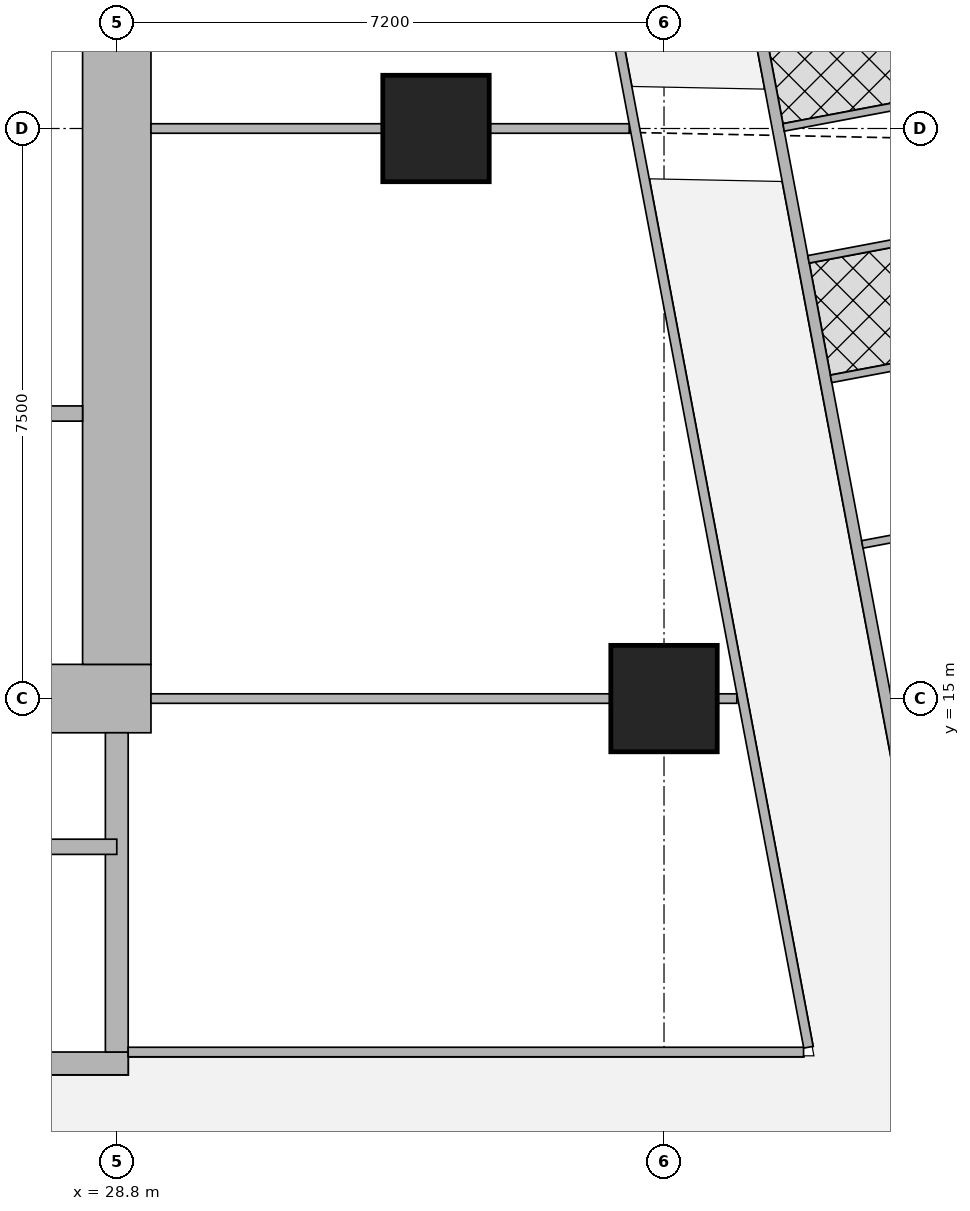
"""IFC4 building model, lengths in metres.
Left out: names, types, materials, properties, quantities, classifications, styles, units other than length and angle.
Written with IfcOpenShell. Run it as: python <this file> out.ifc"""

import sys

from ifc_helpers import new_model, si_unit, direction, frame, frame_2d, origin, origin_2d, place, context, subcontext, project, spatial, rectangle, extrude, element, fill, save


model = new_model("IFC4")
c1 = context("Model", 3, precision=1e-05, world=origin(), true_north=direction((0.0, 1.0)))
c2 = subcontext(c1, "Body", "Model", "MODEL_VIEW")
j1 = project(units=[si_unit("LENGTHUNIT", "METRE"), si_unit("PLANEANGLEUNIT", "RADIAN")], contexts=[c1])
p1 = place(None, origin())
s1 = spatial("IfcSite", under=j1, at=p1, CompositionType="ELEMENT")
p2 = place(p1, origin())
s2 = spatial("IfcBuilding", under=s1, at=p2, CompositionType="ELEMENT")
p3 = place(p2, frame((0.0, 0.0, 204.95)))
s3 = spatial("IfcBuildingStorey", under=s2, at=p3, CompositionType="ELEMENT", Elevation=204.95)
for number, where, z_axis, x_axis in (
    (1, (36.0, 15.0, 0.0), (0.0, 0.0, 1.0), (1.0, 0.0, 0.0)),
    (2, (33.0, 22.5, 0.0), (0.0, 0.0, 1.0), (1.0, 0.0, 0.0)),
):
    element("IfcColumn", number, at=place(p3, frame(where, z_axis=z_axis, x_axis=x_axis)), inside=s3, PredefinedType="COLUMN", context=c2, shape_type="SweptSolid", body=[
        extrude(rectangle(XDim=1.4, YDim=1.4, at=origin_2d()), origin(), (0.0, 0.0, 1.0), 3.75),
    ])
p4 = place(p3, frame((13.95, 15.0, 0.0), z_axis=(0.0, 0.0, 1.0), x_axis=(1.0, 0.0, 0.0)))
e3 = element("IfcWall", 3, at=p4, inside=s3, PredefinedType="SHEAR", context=c2, shape_type="SweptSolid", body=[
    extrude(rectangle(XDim=15.3, YDim=0.9, at=frame_2d((7.65, 0.0))), origin(), (0.0, 0.0, 1.0), 3.75),
])
p5 = place(p4, frame((4.45, 0.0, 0.0)))
e4 = element("IfcOpeningElement", 4, at=p5, cuts=e3, PredefinedType="OPENING", context=c2, shape_type="SweptSolid", body=[
    extrude(rectangle(XDim=1.8, YDim=2.1, at=frame_2d((0.9, 1.05))), frame((0.0, 0.46, 0.0), z_axis=(0.0, -1.0, 0.0), x_axis=(1.0, 0.0, 0.0)), (0.0, 0.0, 1.0), 0.92),
])
p6 = place(p4, frame((10.7, 0.0, 0.0)))
e5 = element("IfcOpeningElement", 5, at=p6, cuts=e3, PredefinedType="OPENING", context=c2, shape_type="SweptSolid", body=[
    extrude(rectangle(XDim=1.1, YDim=2.1, at=frame_2d((0.55, 1.05))), frame((0.0, 0.46, 0.0), z_axis=(0.0, -1.0, 0.0), x_axis=(1.0, 0.0, 0.0)), (0.0, 0.0, 1.0), 0.92),
])
p7 = place(p3, frame((28.8, 15.45, 0.0), z_axis=(0.0, 0.0, 1.0), x_axis=(0.0, 1.0, 0.0)))
e6 = element("IfcWall", 6, at=p7, inside=s3, PredefinedType="SHEAR", context=c2, shape_type="SweptSolid", body=[
    extrude(rectangle(XDim=14.1, YDim=0.9, at=frame_2d((7.05, 0.0))), origin(), (0.0, 0.0, 1.0), 3.75),
])
p8 = place(p3, frame((21.45, 10.2, 0.0), z_axis=(0.0, 0.0, 1.0), x_axis=(1.0, 0.0, 0.0)))
e7 = element("IfcWall", 7, at=p8, inside=s3, PredefinedType="SHEAR", context=c2, shape_type="SweptSolid", body=[
    extrude(rectangle(XDim=7.5, YDim=0.3, at=frame_2d((3.75, 0.0))), origin(), (0.0, 0.0, 1.0), 3.75),
])
p9 = place(p8, frame((0.5, 0.0, 0.0)))
e8 = element("IfcOpeningElement", 8, at=p9, cuts=e7, PredefinedType="OPENING", context=c2, shape_type="SweptSolid", body=[
    extrude(rectangle(XDim=1.1, YDim=2.1, at=frame_2d((0.55, 1.05))), frame((0.0, 0.16, 0.0), z_axis=(0.0, -1.0, 0.0), x_axis=(1.0, 0.0, 0.0)), (0.0, 0.0, 1.0), 0.32),
])
p10 = place(p3, frame((28.8, 10.35, 0.0), z_axis=(0.0, 0.0, 1.0), x_axis=(0.0, 1.0, 0.0)))
e9 = element("IfcWall", 9, at=p10, inside=s3, PredefinedType="SHEAR", context=c2, shape_type="SweptSolid", body=[
    extrude(rectangle(XDim=4.2, YDim=0.3, at=frame_2d((2.1, 0.0))), origin(), (0.0, 0.0, 1.0), 3.75),
])
p11 = place(p3, frame((33.68, 42.723, 0.0), z_axis=(0.0, 0.0, 1.0), x_axis=(0.185601160014, -0.982625162207, 0.0)))
e10 = element("IfcWall", 10, at=p11, inside=s3, PredefinedType="SOLIDWALL", context=c2, shape_type="SweptSolid", body=[
    extrude(rectangle(XDim=41.051, YDim=0.15, at=frame_2d((20.526, 0.0))), origin(), (0.0, 0.0, 1.0), 2.5),
])
p12 = place(p11, frame((12.307, 0.0, 0.0)))
e11 = element("IfcOpeningElement", 11, at=p12, cuts=e10, PredefinedType="OPENING", context=c2, shape_type="SweptSolid", body=[
    extrude(rectangle(XDim=1.0, YDim=2.1, at=frame_2d((0.5, 1.05))), frame((0.0, 0.085, 0.0), z_axis=(0.0, -1.0, 0.0), x_axis=(1.0, 0.0, 0.0)), (0.0, 0.0, 1.0), 0.17),
])
p13 = place(p11, frame((16.123, 0.0, 0.0)))
e12 = element("IfcOpeningElement", 12, at=p13, cuts=e10, PredefinedType="OPENING", context=c2, shape_type="SweptSolid", body=[
    extrude(rectangle(XDim=1.0, YDim=2.1, at=frame_2d((0.5, 1.05))), frame((0.0, 0.085, 0.0), z_axis=(0.0, -1.0, 0.0), x_axis=(1.0, 0.0, 0.0)), (0.0, 0.0, 1.0), 0.17),
])
p14 = place(p11, frame((30.902, 0.0, 0.0)))
e13 = element("IfcOpeningElement", 13, at=p14, cuts=e10, PredefinedType="OPENING", context=c2, shape_type="SweptSolid", body=[
    extrude(rectangle(XDim=1.0, YDim=2.1, at=frame_2d((0.5, 1.05))), frame((0.0, 0.085, 0.0), z_axis=(0.0, -1.0, 0.0), x_axis=(1.0, 0.0, 0.0)), (0.0, 0.0, 1.0), 0.17),
])
p15 = place(p3, frame((41.365, 21.433, 0.0), z_axis=(0.0, 0.0, 1.0), x_axis=(-0.982638553676, -0.185530247748, 0.0)))
e14 = element("IfcWall", 14, at=p15, inside=s3, PredefinedType="PARTITIONING", context=c2, shape_type="SweptSolid", body=[
    extrude(rectangle(XDim=3.525, YDim=0.1, at=frame_2d((1.763, 0.0))), origin(), (0.0, 0.0, 1.0), 3.5),
])
p16 = place(p3, frame((42.073, 17.682, 0.0), z_axis=(0.0, 0.0, 1.0), x_axis=(-0.98265117712, -0.185463376723, 0.0)))
e15 = element("IfcWall", 15, at=p16, inside=s3, PredefinedType="PARTITIONING", context=c2, shape_type="SweptSolid", body=[
    extrude(rectangle(XDim=3.525, YDim=0.1, at=frame_2d((1.763, 0.0))), origin(), (0.0, 0.0, 1.0), 3.5),
])
p17 = place(p16, frame((1.325, 0.0, 0.0)))
e16 = element("IfcOpeningElement", 16, at=p17, cuts=e15, PredefinedType="OPENING", context=c2, shape_type="SweptSolid", body=[
    extrude(rectangle(XDim=0.9, YDim=2.1, at=frame_2d((0.45, 1.05))), frame((0.0, 0.06, 0.0), z_axis=(0.0, -1.0, 0.0), x_axis=(1.0, 0.0, 0.0)), (0.0, 0.0, 1.0), 0.12),
])
p18 = place(p3, frame((41.037, 23.168, 0.0), z_axis=(0.0, 0.0, 1.0), x_axis=(-0.982638553676, -0.185530247748, 0.0)))
e17 = element("IfcWall", 17, at=p18, inside=s3, PredefinedType="PARTITIONING", context=c2, shape_type="SweptSolid", body=[
    extrude(rectangle(XDim=3.525, YDim=0.1, at=frame_2d((1.763, 0.0))), origin(), (0.0, 0.0, 1.0), 2.5),
])
p19 = place(p3, frame((41.662, 19.861, 0.0), z_axis=(0.0, 0.0, 1.0), x_axis=(-0.982588017646, -0.185797706064, 0.0)))
e18 = element("IfcWall", 18, at=p19, inside=s3, PredefinedType="PARTITIONING", context=c2, shape_type="SweptSolid", body=[
    extrude(rectangle(XDim=3.525, YDim=0.1, at=frame_2d((1.763, 0.0))), origin(), (0.0, 0.0, 1.0), 3.5),
])
p20 = place(p3, frame((28.95, 10.35, 0.0), z_axis=(0.0, 0.0, 1.0), x_axis=(1.0, 0.0, 0.0)))
e19 = element("IfcWall", 19, at=p20, inside=s3, PredefinedType="PARTITIONING", context=c2, shape_type="SweptSolid", body=[
    extrude(rectangle(XDim=8.886, YDim=0.125, at=frame_2d((4.443, 0.0))), origin(), (0.0, 0.0, 1.0), 3.5),
])
p21 = place(p3, frame((37.9, 10.413, 0.0), z_axis=(0.0, 0.0, 1.0), x_axis=(-0.185589740669, 0.982627319058, 0.0)))
e20 = element("IfcWall", 20, at=p21, inside=s3, PredefinedType="PARTITIONING", context=c2, shape_type="SweptSolid", body=[
    extrude(rectangle(XDim=24.602, YDim=0.125, at=frame_2d((12.301, 0.0))), origin(), (0.0, 0.0, 1.0), 2.5),
])
p22 = place(p21, frame((0.708, 0.0, 0.0)))
e21 = element("IfcOpeningElement", 21, at=p22, cuts=e20, PredefinedType="OPENING", context=c2, shape_type="SweptSolid", body=[
    extrude(rectangle(XDim=1.0, YDim=2.1, at=frame_2d((0.5, 1.05))), frame((0.0, 0.073, 0.0), z_axis=(0.0, -1.0, 0.0), x_axis=(1.0, 0.0, 0.0)), (0.0, 0.0, 1.0), 0.145),
])
p23 = place(p21, frame((5.65, 0.0, 0.0)))
e22 = element("IfcOpeningElement", 22, at=p23, cuts=e20, PredefinedType="OPENING", context=c2, shape_type="SweptSolid", body=[
    extrude(rectangle(XDim=1.0, YDim=2.1, at=frame_2d((0.5, 1.05))), frame((0.0, 0.073, 0.0), z_axis=(0.0, -1.0, 0.0), x_axis=(1.0, 0.0, 0.0)), (0.0, 0.0, 1.0), 0.145),
])
p24 = place(p21, frame((13.124, 0.0, 0.0)))
e23 = element("IfcOpeningElement", 23, at=p24, cuts=e20, PredefinedType="OPENING", context=c2, shape_type="SweptSolid", body=[
    extrude(rectangle(XDim=1.0, YDim=2.1, at=frame_2d((0.5, 1.05))), frame((0.0, 0.073, 0.0), z_axis=(0.0, -1.0, 0.0), x_axis=(1.0, 0.0, 0.0)), (0.0, 0.0, 1.0), 0.145),
])
p25 = place(p21, frame((16.94, 0.0, 0.0)))
e24 = element("IfcOpeningElement", 24, at=p25, cuts=e20, PredefinedType="OPENING", context=c2, shape_type="SweptSolid", body=[
    extrude(rectangle(XDim=1.0, YDim=2.1, at=frame_2d((0.5, 1.05))), frame((0.0, 0.073, 0.0), z_axis=(0.0, -1.0, 0.0), x_axis=(1.0, 0.0, 0.0)), (0.0, 0.0, 1.0), 0.145),
])
p26 = place(p21, frame((20.9, 0.0, 0.0)))
e25 = element("IfcOpeningElement", 25, at=p26, cuts=e20, PredefinedType="OPENING", context=c2, shape_type="SweptSolid", body=[
    extrude(rectangle(XDim=1.0, YDim=2.1, at=frame_2d((0.5, 1.05))), frame((0.0, 0.073, 0.0), z_axis=(0.0, -1.0, 0.0), x_axis=(1.0, 0.0, 0.0)), (0.0, 0.0, 1.0), 0.145),
])
p27 = place(p3, frame((29.25, 15.0, 0.0), z_axis=(0.0, 0.0, 1.0), x_axis=(1.0, 0.0, 0.0)))
e26 = element("IfcWall", 26, at=p27, inside=s3, PredefinedType="PARTITIONING", context=c2, shape_type="SweptSolid", body=[
    extrude(rectangle(XDim=6.049, YDim=0.125, at=frame_2d((3.024, 0.0))), origin(), (0.0, 0.0, 1.0), 3.5),
])
p28 = place(p3, frame((36.701, 15.0, 0.0), z_axis=(0.0, 0.0, 1.0), x_axis=(1.0, 0.0, 0.0)))
e27 = element("IfcWall", 27, at=p28, inside=s3, PredefinedType="PARTITIONING", context=c2, shape_type="SweptSolid", body=[
    extrude(rectangle(XDim=0.257, YDim=0.125, at=frame_2d((0.128, 0.0))), origin(), (0.0, 0.0, 1.0), 3.5),
])
p29 = place(p3, frame((29.25, 22.5, 0.0), z_axis=(0.0, 0.0, 1.0), x_axis=(1.0, 0.0, 0.0)))
e28 = element("IfcWall", 28, at=p29, inside=s3, PredefinedType="PARTITIONING", context=c2, shape_type="SweptSolid", body=[
    extrude(rectangle(XDim=3.049, YDim=0.125, at=frame_2d((1.524, 0.0))), origin(), (0.0, 0.0, 1.0), 3.5),
])
p30 = place(p3, frame((33.701, 22.5, 0.0), z_axis=(0.0, 0.0, 1.0), x_axis=(1.0, 0.0, 0.0)))
e29 = element("IfcWall", 29, at=p30, inside=s3, PredefinedType="PARTITIONING", context=c2, shape_type="SweptSolid", body=[
    extrude(rectangle(XDim=1.841, YDim=0.125, at=frame_2d((0.92, 0.0))), origin(), (0.0, 0.0, 1.0), 2.5),
])
p31 = place(p3, frame((23.0, 13.05, 0.0), z_axis=(0.0, 0.0, 1.0), x_axis=(1.0, 0.0, 0.0)))
e30 = element("IfcWall", 30, at=p31, inside=s3, PredefinedType="SHEAR", context=c2, shape_type="SweptSolid", body=[
    extrude(rectangle(XDim=5.8, YDim=0.2, at=frame_2d((2.9, 0.0))), origin(), (0.0, 0.0, 1.0), 3.75),
])
p32 = place(p3, frame((27.4, 18.75, 0.0), z_axis=(0.0, 0.0, 1.0), x_axis=(1.0, 0.0, 0.0)))
e31 = element("IfcWall", 31, at=p32, inside=s3, PredefinedType="SOLIDWALL", context=c2, shape_type="SweptSolid", body=[
    extrude(rectangle(XDim=0.95, YDim=0.2, at=frame_2d((0.475, 0.0))), origin(), (0.0, 0.0, 1.0), 3.5),
])
p33 = place(p22, origin())
e32 = element("IfcDoor", 32, at=p33, inside=s3, OperationType="SINGLE_SWING_LEFT", PredefinedType="DOOR", context=c2, shape_type="SweptSolid", body=[
    extrude(rectangle(XDim=1.0, YDim=2.1, at=frame_2d((0.5, 1.05))), frame((0.0, 0.025, 0.0), z_axis=(0.0, -1.0, 0.0), x_axis=(1.0, 0.0, 0.0)), (0.0, 0.0, 1.0), 0.05),
])
fill(e21, e32)
p34 = place(p23, origin())
e33 = element("IfcDoor", 33, at=p34, inside=s3, OperationType="SINGLE_SWING_LEFT", PredefinedType="DOOR", context=c2, shape_type="SweptSolid", body=[
    extrude(rectangle(XDim=1.0, YDim=2.1, at=frame_2d((0.5, 1.05))), frame((0.0, 0.025, 0.0), z_axis=(0.0, -1.0, 0.0), x_axis=(1.0, 0.0, 0.0)), (0.0, 0.0, 1.0), 0.05),
])
fill(e22, e33)
p35 = place(p24, origin())
e34 = element("IfcDoor", 34, at=p35, inside=s3, OperationType="SINGLE_SWING_LEFT", PredefinedType="DOOR", context=c2, shape_type="SweptSolid", body=[
    extrude(rectangle(XDim=1.0, YDim=2.1, at=frame_2d((0.5, 1.05))), frame((0.0, 0.025, 0.0), z_axis=(0.0, -1.0, 0.0), x_axis=(1.0, 0.0, 0.0)), (0.0, 0.0, 1.0), 0.05),
])
fill(e23, e34)
save(model, sys.argv[1])
